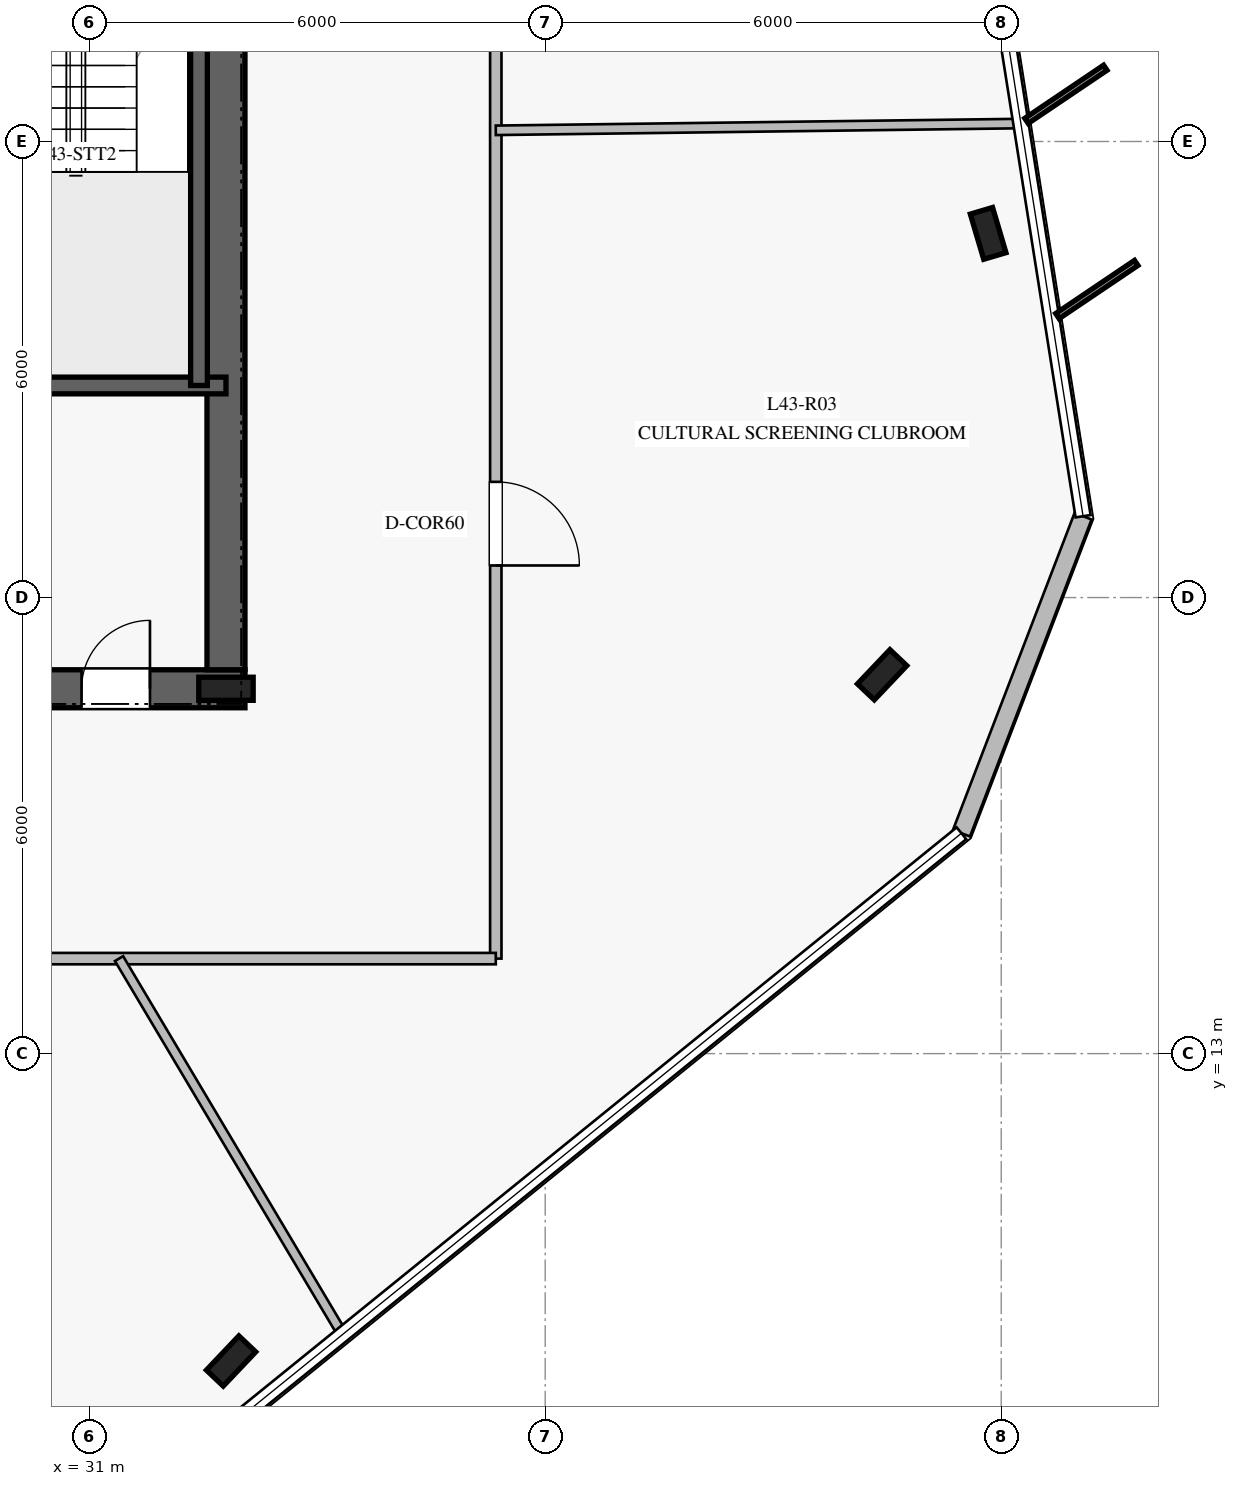
"""IFC4 building model, lengths in metres.
Left out: names, types, materials, properties, quantities, classifications, styles, units other than length and angle.
Written with IfcOpenShell. Run it as: python <this file> out.ifc"""

import sys

from ifc_helpers import new_model, si_unit, direction, frame, frame_2d, origin, origin_2d, place, context, subcontext, project, spatial, rectangle, i_section, extrude, element, fill, save


model = new_model("IFC4")
c1 = context("Model", 3, precision=1e-05, world=origin(), true_north=direction((0.0, 1.0)))
c2 = subcontext(c1, "Body", "Model", "MODEL_VIEW")
j1 = project(units=[si_unit("LENGTHUNIT", "METRE"), si_unit("PLANEANGLEUNIT", "RADIAN")], contexts=[c1])
p1 = place(None, origin())
s1 = spatial("IfcSite", under=j1, at=p1, CompositionType="ELEMENT")
p2 = place(p1, origin())
s2 = spatial("IfcBuilding", under=s1, at=p2, CompositionType="ELEMENT")
p3 = place(p2, frame((0.0, 0.0, 180.8)))
s3 = spatial("IfcBuildingStorey", under=s2, at=p3, CompositionType="ELEMENT", Elevation=180.8)
p4 = place(p3, frame((16.95, 17.8, 0.0), z_axis=(0.0, 0.0, 1.0), x_axis=(1.0, 0.0, 0.0)))
e1 = element("IfcWall", 1, at=p4, inside=s3, PredefinedType="SHEAR", context=c2, shape_type="SweptSolid", body=[
    extrude(rectangle(XDim=16.1, YDim=0.5, at=frame_2d((8.05, 0.0))), origin(), (0.0, 0.0, 1.0), 3.78),
])
p5 = place(p4, frame((5.0, 0.0, 0.0)))
e2 = element("IfcOpeningElement", 2, at=p5, cuts=e1, PredefinedType="OPENING", context=c2, shape_type="SweptSolid", body=[
    extrude(rectangle(XDim=1.2, YDim=2.25, at=frame_2d((0.6, 1.125))), frame((0.0, 0.26, 0.0), z_axis=(0.0, -1.0, 0.0), x_axis=(1.0, 0.0, 0.0)), (0.0, 0.0, 1.0), 0.52),
])
p6 = place(p4, frame((13.95, 0.0, 0.0)))
e3 = element("IfcOpeningElement", 3, at=p6, cuts=e1, PredefinedType="OPENING", context=c2, shape_type="SweptSolid", body=[
    extrude(rectangle(XDim=0.9, YDim=2.1, at=frame_2d((0.45, 1.05))), frame((0.0, 0.26, 0.0), z_axis=(0.0, -1.0, 0.0), x_axis=(1.0, 0.0, 0.0)), (0.0, 0.0, 1.0), 0.52),
])
p7 = place(p4, frame((9.2, 0.0, 0.0)))
e4 = element("IfcOpeningElement", 4, at=p7, cuts=e1, PredefinedType="OPENING", context=c2, shape_type="SweptSolid", body=[
    extrude(rectangle(XDim=1.1, YDim=2.2, at=frame_2d((0.55, 1.1))), frame((0.0, 0.26, 0.0), z_axis=(0.0, -1.0, 0.0), x_axis=(1.0, 0.0, 0.0)), (0.0, 0.0, 1.0), 0.52),
])
p8 = place(p3, frame((32.8, 18.05, 0.0), z_axis=(0.0, 0.0, 1.0), x_axis=(0.0, 1.0, 0.0)))
e5 = element("IfcWall", 5, at=p8, inside=s3, PredefinedType="SHEAR", context=c2, shape_type="SweptSolid", body=[
    extrude(rectangle(XDim=13.9, YDim=0.5, at=frame_2d((6.95, 0.0))), origin(), (0.0, 0.0, 1.0), 3.78),
])
p9 = place(p3, frame((32.8, 17.8, 0.0), z_axis=(0.0, 0.0, 1.0), x_axis=(1.0, 0.0, 0.0)))
e6 = element("IfcColumn", 6, at=p9, inside=s3, PredefinedType="COLUMN", context=c2, shape_type="SweptSolid", body=[
    extrude(i_section(OverallWidth=0.304, OverallDepth=0.716, WebThickness=0.021, FlangeThickness=0.04, at=origin_2d()), origin(), (0.0, 0.0, 1.0), 4.0),
])
p10 = place(p3, frame((29.08, 21.79, 0.0), z_axis=(0.0, 0.0, 1.0), x_axis=(1.0, 0.0, 0.0)))
e7 = element("IfcWall", 7, at=p10, inside=s3, PredefinedType="SOLIDWALL", context=c2, shape_type="SweptSolid", body=[
    extrude(rectangle(XDim=3.72, YDim=0.22, at=frame_2d((1.86, 0.0))), origin(), (0.0, 0.0, 1.0), 3.78),
])
p11 = place(p3, frame((32.445, 29.01, 0.0), z_axis=(0.0, 0.0, 1.0), x_axis=(0.0, -1.0, 0.0)))
e8 = element("IfcWall", 8, at=p11, inside=s3, PredefinedType="SOLIDWALL", context=c2, shape_type="SweptSolid", body=[
    extrude(rectangle(XDim=7.22, YDim=0.22, at=frame_2d((3.61, 0.0))), origin(), (0.0, 0.0, 1.0), 3.78),
])
for number, where, z_axis, x_axis in (
    (9, (32.867, 8.956, 0.0), (0.0, 0.0, 1.0), (0.688, 0.725, 0.0)),
    (10, (41.433, 17.984, 0.0), (0.0, 0.0, 1.0), (0.688, 0.725, 0.0)),
    (11, (42.828, 23.791, 0.0), (0.0, 0.0, 1.0), (-0.284, 0.959, 0.0)),
):
    element("IfcColumn", number, at=place(p3, frame(where, z_axis=z_axis, x_axis=x_axis)), inside=s3, PredefinedType="COLUMN", context=c2, shape_type="SweptSolid", body=[
        extrude(i_section(OverallWidth=0.305, OverallDepth=0.62, WebThickness=0.021, FlangeThickness=0.04, at=origin_2d()), origin(), (0.0, 0.0, 1.0), 4.0),
    ])
p12 = place(p3, frame((42.477, 15.899, 0.0), z_axis=(0.0, 0.0, 1.0), x_axis=(0.358114682982, 0.933677607011, 0.0)))
e12 = element("IfcWall", 12, at=p12, inside=s3, PredefinedType="STANDARD", context=c2, shape_type="SweptSolid", body=[
    extrude(rectangle(XDim=4.468, YDim=0.24, at=frame_2d((2.234, 0.0))), origin(), (0.0, 0.0, 1.0), 3.78),
])
p13 = place(p3, frame((36.35, 35.75, 0.0), z_axis=(0.0, 0.0, 1.0), x_axis=(0.0, -1.0, 0.0)))
e13 = element("IfcWall", 13, at=p13, inside=s3, PredefinedType="PARTITIONING", context=c2, shape_type="SweptSolid", body=[
    extrude(rectangle(XDim=21.5, YDim=0.15, at=frame_2d((10.75, 0.0))), origin(), (0.0, 0.0, 1.0), 3.28),
])
p14 = place(p13, frame((15.228, 0.0, 0.0)))
e14 = element("IfcOpeningElement", 14, at=p14, cuts=e13, PredefinedType="OPENING", context=c2, shape_type="SweptSolid", body=[
    extrude(rectangle(XDim=1.1, YDim=2.2, at=frame_2d((0.55, 1.1))), frame((0.0, 0.085, 0.0), z_axis=(0.0, -1.0, 0.0), x_axis=(1.0, 0.0, 0.0)), (0.0, 0.0, 1.0), 0.17),
])
p15 = place(p13, frame((4.935, 0.0, 0.0)))
e15 = element("IfcOpeningElement", 15, at=p15, cuts=e13, PredefinedType="OPENING", context=c2, shape_type="SweptSolid", body=[
    extrude(rectangle(XDim=1.1, YDim=2.2, at=frame_2d((0.55, 1.1))), frame((0.0, 0.085, 0.0), z_axis=(0.0, -1.0, 0.0), x_axis=(1.0, 0.0, 0.0)), (0.0, 0.0, 1.0), 0.17),
])
p16 = place(p3, frame((36.35, 14.25, 0.0), z_axis=(0.0, 0.0, 1.0), x_axis=(-1.0, 0.0, 0.0)))
e16 = element("IfcWall", 16, at=p16, inside=s3, PredefinedType="PARTITIONING", context=c2, shape_type="SweptSolid", body=[
    extrude(rectangle(XDim=22.7, YDim=0.15, at=frame_2d((11.35, 0.0))), origin(), (0.0, 0.0, 1.0), 3.05),
])
p17 = place(p16, frame((19.326, 0.0, 0.0)))
e17 = element("IfcOpeningElement", 17, at=p17, cuts=e16, PredefinedType="OPENING", context=c2, shape_type="SweptSolid", body=[
    extrude(rectangle(XDim=1.1, YDim=2.2, at=frame_2d((0.55, 1.1))), frame((0.0, 0.085, 0.0), z_axis=(0.0, -1.0, 0.0), x_axis=(1.0, 0.0, 0.0)), (0.0, 0.0, 1.0), 0.17),
])
p18 = place(p16, frame((10.613, 0.0, 0.0)))
e18 = element("IfcOpeningElement", 18, at=p18, cuts=e16, PredefinedType="OPENING", context=c2, shape_type="SweptSolid", body=[
    extrude(rectangle(XDim=1.1, YDim=2.2, at=frame_2d((0.55, 1.1))), frame((0.0, 0.085, 0.0), z_axis=(0.0, -1.0, 0.0), x_axis=(1.0, 0.0, 0.0)), (0.0, 0.0, 1.0), 0.17),
])
p19 = place(p3, frame((31.393, 14.25, 0.0), z_axis=(0.0, 0.0, 1.0), x_axis=(0.511200293468, -0.85946161052, 0.0)))
e19 = element("IfcWall", 19, at=p19, inside=s3, PredefinedType="PARTITIONING", context=c2, shape_type="SweptSolid", body=[
    extrude(rectangle(XDim=5.737, YDim=0.125, at=frame_2d((2.869, 0.0))), origin(), (0.0, 0.0, 1.0), 3.18),
])
p20 = place(p3, frame((36.35, 25.147, 0.0), z_axis=(0.0, 0.0, 1.0), x_axis=(0.999916442153, 0.012927053497, 0.0)))
e20 = element("IfcWall", 20, at=p20, inside=s3, PredefinedType="PARTITIONING", context=c2, shape_type="SweptSolid", body=[
    extrude(rectangle(XDim=6.893, YDim=0.125, at=frame_2d((3.447, 0.0))), origin(), (0.0, 0.0, 1.0), 3.18),
])
p21 = place(p6, origin())
e21 = element("IfcDoor", 21, at=p21, inside=s3, OperationType="SINGLE_SWING_RIGHT", PredefinedType="DOOR", context=c2, shape_type="SweptSolid", body=[
    extrude(rectangle(XDim=0.9, YDim=2.1, at=frame_2d((0.45, 1.05))), frame((0.0, 0.025, 0.0), z_axis=(0.0, -1.0, 0.0), x_axis=(1.0, 0.0, 0.0)), (0.0, 0.0, 1.0), 0.05),
])
fill(e3, e21)
p22 = place(p14, origin())
e22 = element("IfcDoor", 22, at=p22, inside=s3, OperationType="SINGLE_SWING_RIGHT", PredefinedType="DOOR", context=c2, shape_type="SweptSolid", body=[
    extrude(rectangle(XDim=1.1, YDim=2.2, at=frame_2d((0.55, 1.1))), frame((0.0, 0.025, 0.0), z_axis=(0.0, -1.0, 0.0), x_axis=(1.0, 0.0, 0.0)), (0.0, 0.0, 1.0), 0.05),
])
fill(e14, e22)
save(model, sys.argv[1])
